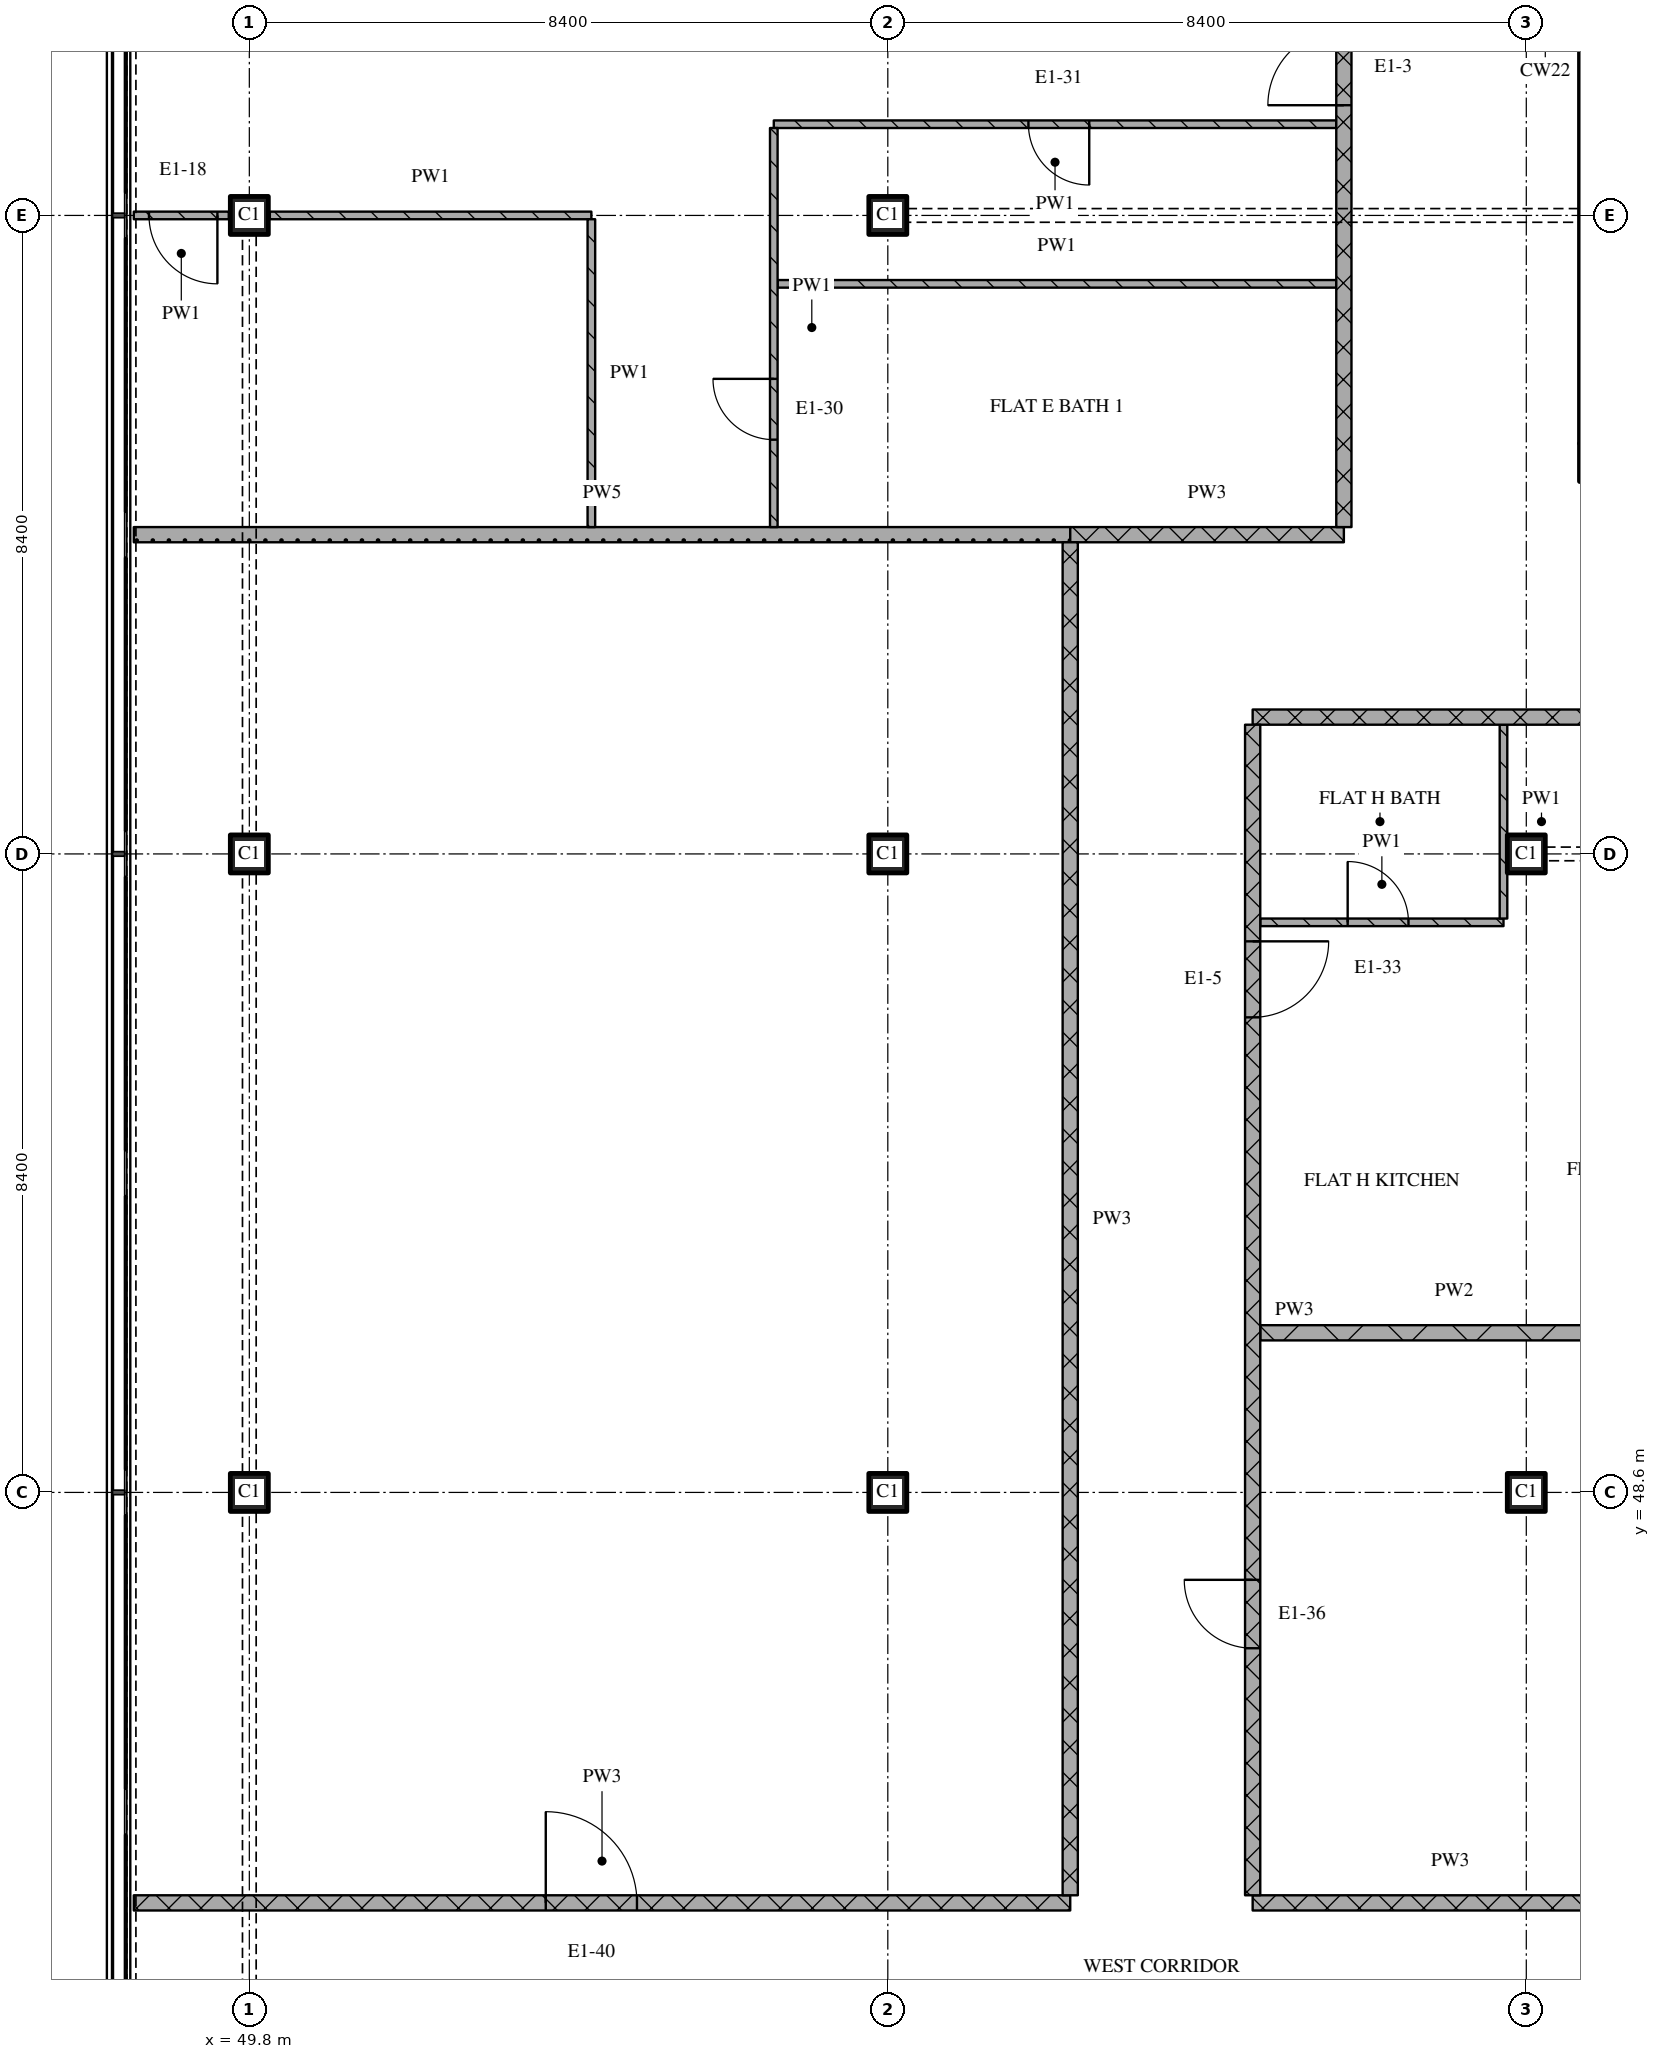
"""IFC4 building model, lengths in metres.
Left out: names, types, materials, properties, quantities, classifications, styles, units other than length and angle.
Written with IfcOpenShell. Run it as: python <this file> out.ifc"""

import sys

from ifc_helpers import new_model, si_unit, direction, frame, frame_2d, origin, origin_2d, place, context, subcontext, project, spatial, rectangle, extrude, element, fill, save


model = new_model("IFC4")
c1 = context("Model", 3, precision=1e-05, world=origin(), true_north=direction((0.0, 1.0)))
c2 = subcontext(c1, "Body", "Model", "MODEL_VIEW")
j1 = project(units=[si_unit("LENGTHUNIT", "METRE"), si_unit("PLANEANGLEUNIT", "RADIAN")], contexts=[c1])
p1 = place(None, origin())
s1 = spatial("IfcSite", under=j1, at=p1, CompositionType="ELEMENT")
p2 = place(p1, origin())
s2 = spatial("IfcBuilding", under=s1, at=p2, CompositionType="ELEMENT")
p3 = place(p2, frame((0.0, 0.0, 267.15)))
s3 = spatial("IfcBuildingStorey", under=s2, at=p3, CompositionType="ELEMENT", Elevation=267.15)
for number, where, z_axis, x_axis in (
    (1, (49.8, 48.6, 0.0), (0.0, 0.0, 1.0), (1.0, 0.0, 0.0)),
    (2, (49.8, 57.0, 0.0), (0.0, 0.0, 1.0), (1.0, 0.0, 0.0)),
    (3, (49.8, 65.4, 0.0), (0.0, 0.0, 1.0), (1.0, 0.0, 0.0)),
    (4, (58.2, 48.6, 0.0), (0.0, 0.0, 1.0), (1.0, 0.0, 0.0)),
    (5, (58.2, 57.0, 0.0), (0.0, 0.0, 1.0), (1.0, 0.0, 0.0)),
    (6, (58.2, 65.4, 0.0), (0.0, 0.0, 1.0), (1.0, 0.0, 0.0)),
    (7, (66.6, 48.6, 0.0), (0.0, 0.0, 1.0), (1.0, 0.0, 0.0)),
    (8, (66.6, 57.0, 0.0), (0.0, 0.0, 1.0), (1.0, 0.0, 0.0)),
):
    element("IfcColumn", number, at=place(p3, frame(where, z_axis=z_axis, x_axis=x_axis)), inside=s3, PredefinedType="COLUMN", context=c2, shape_type="SweptSolid", body=[
        extrude(rectangle(XDim=0.5, YDim=0.5, at=origin_2d()), origin(), (0.0, 0.0, 1.0), 3.6),
    ])
p4 = place(p3, frame((67.3, 62.15, 0.0), z_axis=(0.0, 0.0, 1.0), x_axis=(1.0, 0.0, 0.0)))
e9 = element("IfcWall", 9, at=p4, inside=s3, PredefinedType="SOLIDWALL", context=c2, shape_type="SweptSolid", body=[
    extrude(rectangle(XDim=40.6, YDim=0.5, at=frame_2d((20.3, 0.0))), origin(), (0.0, 0.0, 1.0), 3.32),
])
p5 = place(p4, frame((20.65, 0.0, 0.0)))
e10 = element("IfcOpeningElement", 10, at=p5, cuts=e9, PredefinedType="OPENING", context=c2, shape_type="SweptSolid", body=[
    extrude(rectangle(XDim=1.8, YDim=2.1, at=frame_2d((0.9, 1.05))), frame((0.0, 0.26, 0.0), z_axis=(0.0, -1.0, 0.0), x_axis=(1.0, 0.0, 0.0)), (0.0, 0.0, 1.0), 0.52),
])
p6 = place(p3, frame((48.28, 43.2, 0.0), z_axis=(0.0, 0.0, 1.0), x_axis=(1.0, 0.0, 0.0)))
e11 = element("IfcWall", 11, at=p6, inside=s3, PredefinedType="PARTITIONING", context=c2, shape_type="SweptSolid", body=[
    extrude(rectangle(XDim=12.32, YDim=0.2, at=frame_2d((6.16, 0.0))), origin(), (0.0, 0.0, 1.0), 3.32),
])
p7 = place(p6, frame((5.42, 0.0, 0.0)))
e12 = element("IfcOpeningElement", 12, at=p7, cuts=e11, PredefinedType="OPENING", context=c2, shape_type="SweptSolid", body=[
    extrude(rectangle(XDim=1.2, YDim=2.1, at=frame_2d((0.6, 1.05))), frame((0.0, 0.11, 0.0), z_axis=(0.0, -1.0, 0.0), x_axis=(1.0, 0.0, 0.0)), (0.0, 0.0, 1.0), 0.22),
])
p8 = place(p3, frame((63.0, 43.2, 0.0), z_axis=(0.0, 0.0, 1.0), x_axis=(1.0, 0.0, 0.0)))
e13 = element("IfcWall", 13, at=p8, inside=s3, PredefinedType="PARTITIONING", context=c2, shape_type="SweptSolid", body=[
    extrude(rectangle(XDim=5.2, YDim=0.2, at=frame_2d((2.6, 0.0))), origin(), (0.0, 0.0, 1.0), 3.32),
])
p9 = place(p3, frame((63.1, 50.7, 0.0), z_axis=(0.0, 0.0, 1.0), x_axis=(1.0, 0.0, 0.0)))
e14 = element("IfcWall", 14, at=p9, inside=s3, PredefinedType="PARTITIONING", context=c2, shape_type="SweptSolid", body=[
    extrude(rectangle(XDim=5.1, YDim=0.2, at=frame_2d((2.55, 0.0))), origin(), (0.0, 0.0, 1.0), 3.32),
])
p10 = place(p3, frame((63.1, 56.1, 0.0), z_axis=(0.0, 0.0, 1.0), x_axis=(1.0, 0.0, 0.0)))
e15 = element("IfcWall", 15, at=p10, inside=s3, PredefinedType="PARTITIONING", context=c2, shape_type="SweptSolid", body=[
    extrude(rectangle(XDim=3.2, YDim=0.1, at=frame_2d((1.6, 0.0))), origin(), (0.0, 0.0, 1.0), 3.32),
])
p11 = place(p10, frame((1.15, 0.0, 0.0)))
e16 = element("IfcOpeningElement", 16, at=p11, cuts=e15, PredefinedType="OPENING", context=c2, shape_type="SweptSolid", body=[
    extrude(rectangle(XDim=0.8, YDim=2.1, at=frame_2d((0.4, 1.05))), frame((0.0, 0.06, 0.0), z_axis=(0.0, -1.0, 0.0), x_axis=(1.0, 0.0, 0.0)), (0.0, 0.0, 1.0), 0.12),
])
p12 = place(p3, frame((63.0, 58.8, 0.0), z_axis=(0.0, 0.0, 1.0), x_axis=(1.0, 0.0, 0.0)))
e17 = element("IfcWall", 17, at=p12, inside=s3, PredefinedType="PARTITIONING", context=c2, shape_type="SweptSolid", body=[
    extrude(rectangle(XDim=10.8, YDim=0.2, at=frame_2d((5.4, 0.0))), origin(), (0.0, 0.0, 1.0), 3.32),
])
p13 = place(p3, frame((60.6, 61.2, 0.0), z_axis=(0.0, 0.0, 1.0), x_axis=(1.0, 0.0, 0.0)))
e18 = element("IfcWall", 18, at=p13, inside=s3, PredefinedType="PARTITIONING", context=c2, shape_type="SweptSolid", body=[
    extrude(rectangle(XDim=3.6, YDim=0.2, at=frame_2d((1.8, 0.0))), origin(), (0.0, 0.0, 1.0), 3.32),
])
p14 = place(p3, frame((48.28, 61.2, 0.0), z_axis=(0.0, 0.0, 1.0), x_axis=(1.0, 0.0, 0.0)))
e19 = element("IfcWall", 19, at=p14, inside=s3, PredefinedType="PARTITIONING", context=c2, shape_type="SweptSolid", body=[
    extrude(rectangle(XDim=12.32, YDim=0.2, at=frame_2d((6.16, 0.0))), origin(), (0.0, 0.0, 1.0), 3.32),
])
p15 = place(p3, frame((56.75, 64.5, 0.0), z_axis=(0.0, 0.0, 1.0), x_axis=(1.0, 0.0, 0.0)))
e20 = element("IfcWall", 20, at=p15, inside=s3, PredefinedType="PARTITIONING", context=c2, shape_type="SweptSolid", body=[
    extrude(rectangle(XDim=7.35, YDim=0.1, at=frame_2d((3.675, 0.0))), origin(), (0.0, 0.0, 1.0), 3.32),
])
p16 = place(p3, frame((49.53, 65.4, 0.0), z_axis=(0.0, 0.0, 1.0), x_axis=(-1.0, 0.0, 0.0)))
e21 = element("IfcWall", 21, at=p16, inside=s3, PredefinedType="PARTITIONING", context=c2, shape_type="SweptSolid", body=[
    extrude(rectangle(XDim=1.25, YDim=0.1, at=frame_2d((0.625, 0.0))), origin(), (0.0, 0.0, 1.0), 3.32),
])
p17 = place(p16, frame((0.15, 0.0, 0.0)))
e22 = element("IfcOpeningElement", 22, at=p17, cuts=e21, PredefinedType="OPENING", context=c2, shape_type="SweptSolid", body=[
    extrude(rectangle(XDim=0.9, YDim=2.1, at=frame_2d((0.45, 1.05))), frame((0.0, 0.06, 0.0), z_axis=(0.0, -1.0, 0.0), x_axis=(1.0, 0.0, 0.0)), (0.0, 0.0, 1.0), 0.12),
])
p18 = place(p3, frame((50.07, 65.4, 0.0), z_axis=(0.0, 0.0, 1.0), x_axis=(1.0, 0.0, 0.0)))
e23 = element("IfcWall", 23, at=p18, inside=s3, PredefinedType="PARTITIONING", context=c2, shape_type="SweptSolid", body=[
    extrude(rectangle(XDim=4.23, YDim=0.1, at=frame_2d((2.115, 0.0))), origin(), (0.0, 0.0, 1.0), 2.83),
])
p19 = place(p3, frame((64.1, 66.6, 0.0), z_axis=(0.0, 0.0, 1.0), x_axis=(-1.0, 0.0, 0.0)))
e24 = element("IfcWall", 24, at=p19, inside=s3, PredefinedType="PARTITIONING", context=c2, shape_type="SweptSolid", body=[
    extrude(rectangle(XDim=7.4, YDim=0.1, at=frame_2d((3.7, 0.0))), origin(), (0.0, 0.0, 1.0), 3.32),
])
p20 = place(p19, frame((3.25, 0.0, 0.0)))
e25 = element("IfcOpeningElement", 25, at=p20, cuts=e24, PredefinedType="OPENING", context=c2, shape_type="SweptSolid", body=[
    extrude(rectangle(XDim=0.8, YDim=2.1, at=frame_2d((0.4, 1.05))), frame((0.0, 0.06, 0.0), z_axis=(0.0, -1.0, 0.0), x_axis=(1.0, 0.0, 0.0)), (0.0, 0.0, 1.0), 0.12),
])
p21 = place(p3, frame((54.3, 65.35, 0.0), z_axis=(0.0, 0.0, 1.0), x_axis=(0.0, -1.0, 0.0)))
e26 = element("IfcWall", 26, at=p21, inside=s3, PredefinedType="PARTITIONING", context=c2, shape_type="SweptSolid", body=[
    extrude(rectangle(XDim=4.05, YDim=0.1, at=frame_2d((2.025, 0.0))), origin(), (0.0, 0.0, 1.0), 3.32),
])
p22 = place(p3, frame((56.7, 66.55, 0.0), z_axis=(0.0, 0.0, 1.0), x_axis=(0.0, -1.0, 0.0)))
e27 = element("IfcWall", 27, at=p22, inside=s3, PredefinedType="PARTITIONING", context=c2, shape_type="SweptSolid", body=[
    extrude(rectangle(XDim=5.25, YDim=0.1, at=frame_2d((2.625, 0.0))), origin(), (0.0, 0.0, 1.0), 3.32),
])
p23 = place(p22, frame((3.3, 0.0, 0.0)))
e28 = element("IfcOpeningElement", 28, at=p23, cuts=e27, PredefinedType="OPENING", context=c2, shape_type="SweptSolid", body=[
    extrude(rectangle(XDim=0.8, YDim=2.1, at=frame_2d((0.4, 1.05))), frame((0.0, 0.06, 0.0), z_axis=(0.0, -1.0, 0.0), x_axis=(1.0, 0.0, 0.0)), (0.0, 0.0, 1.0), 0.12),
])
p24 = place(p3, frame((60.6, 61.1, 0.0), z_axis=(0.0, 0.0, 1.0), x_axis=(0.0, -1.0, 0.0)))
e29 = element("IfcWall", 29, at=p24, inside=s3, PredefinedType="PARTITIONING", context=c2, shape_type="SweptSolid", body=[
    extrude(rectangle(XDim=17.8, YDim=0.2, at=frame_2d((8.9, 0.0))), origin(), (0.0, 0.0, 1.0), 3.32),
])
p25 = place(p3, frame((63.0, 58.7, 0.0), z_axis=(0.0, 0.0, 1.0), x_axis=(0.0, -1.0, 0.0)))
e30 = element("IfcWall", 30, at=p25, inside=s3, PredefinedType="PARTITIONING", context=c2, shape_type="SweptSolid", body=[
    extrude(rectangle(XDim=15.4, YDim=0.2, at=frame_2d((7.7, 0.0))), origin(), (0.0, 0.0, 1.0), 3.32),
])
p26 = place(p25, frame((2.85, 0.0, 0.0)))
e31 = element("IfcOpeningElement", 31, at=p26, cuts=e30, PredefinedType="OPENING", context=c2, shape_type="SweptSolid", body=[
    extrude(rectangle(XDim=1.0, YDim=2.1, at=frame_2d((0.5, 1.05))), frame((0.0, 0.11, 0.0), z_axis=(0.0, -1.0, 0.0), x_axis=(1.0, 0.0, 0.0)), (0.0, 0.0, 1.0), 0.22),
])
p27 = place(p25, frame((11.25, 0.0, 0.0)))
e32 = element("IfcOpeningElement", 32, at=p27, cuts=e30, PredefinedType="OPENING", context=c2, shape_type="SweptSolid", body=[
    extrude(rectangle(XDim=0.9, YDim=2.1, at=frame_2d((0.45, 1.05))), frame((0.0, 0.11, 0.0), z_axis=(0.0, -1.0, 0.0), x_axis=(1.0, 0.0, 0.0)), (0.0, 0.0, 1.0), 0.22),
])
p28 = place(p3, frame((64.2, 61.3, 0.0), z_axis=(0.0, 0.0, 1.0), x_axis=(0.0, 1.0, 0.0)))
e33 = element("IfcWall", 33, at=p28, inside=s3, PredefinedType="PARTITIONING", context=c2, shape_type="SweptSolid", body=[
    extrude(rectangle(XDim=14.02, YDim=0.2, at=frame_2d((7.01, 0.0))), origin(), (0.0, 0.0, 1.0), 3.32),
])
p29 = place(p28, frame((5.55, 0.0, 0.0)))
e34 = element("IfcOpeningElement", 34, at=p29, cuts=e33, PredefinedType="OPENING", context=c2, shape_type="SweptSolid", body=[
    extrude(rectangle(XDim=1.0, YDim=2.1, at=frame_2d((0.5, 1.05))), frame((0.0, 0.11, 0.0), z_axis=(0.0, -1.0, 0.0), x_axis=(1.0, 0.0, 0.0)), (0.0, 0.0, 1.0), 0.22),
])
p30 = place(p3, frame((66.3, 58.7, 0.0), z_axis=(0.0, 0.0, 1.0), x_axis=(0.0, -1.0, 0.0)))
e35 = element("IfcWall", 35, at=p30, inside=s3, PredefinedType="PARTITIONING", context=c2, shape_type="SweptSolid", body=[
    extrude(rectangle(XDim=2.55, YDim=0.1, at=frame_2d((1.275, 0.0))), origin(), (0.0, 0.0, 1.0), 3.32),
])
p31 = place(p7, origin())
e36 = element("IfcDoor", 36, at=p31, inside=s3, OperationType="SINGLE_SWING_LEFT", PredefinedType="DOOR", context=c2, shape_type="SweptSolid", body=[
    extrude(rectangle(XDim=1.2, YDim=2.1, at=frame_2d((0.6, 1.05))), frame((0.0, 0.025, 0.0), z_axis=(0.0, -1.0, 0.0), x_axis=(1.0, 0.0, 0.0)), (0.0, 0.0, 1.0), 0.05),
])
fill(e12, e36)
p32 = place(p11, origin())
e37 = element("IfcDoor", 37, at=p32, inside=s3, OperationType="SINGLE_SWING_LEFT", PredefinedType="DOOR", context=c2, shape_type="SweptSolid", body=[
    extrude(rectangle(XDim=0.8, YDim=2.1, at=frame_2d((0.4, 1.05))), frame((0.0, 0.025, 0.0), z_axis=(0.0, -1.0, 0.0), x_axis=(1.0, 0.0, 0.0)), (0.0, 0.0, 1.0), 0.05),
])
fill(e16, e37)
p33 = place(p17, origin())
e38 = element("IfcDoor", 38, at=p33, inside=s3, OperationType="SINGLE_SWING_LEFT", PredefinedType="DOOR", context=c2, shape_type="SweptSolid", body=[
    extrude(rectangle(XDim=0.9, YDim=2.1, at=frame_2d((0.45, 1.05))), frame((0.0, 0.025, 0.0), z_axis=(0.0, -1.0, 0.0), x_axis=(1.0, 0.0, 0.0)), (0.0, 0.0, 1.0), 0.05),
])
fill(e22, e38)
p34 = place(p20, origin())
e39 = element("IfcDoor", 39, at=p34, inside=s3, OperationType="SINGLE_SWING_LEFT", PredefinedType="DOOR", context=c2, shape_type="SweptSolid", body=[
    extrude(rectangle(XDim=0.8, YDim=2.1, at=frame_2d((0.4, 1.05))), frame((0.0, 0.025, 0.0), z_axis=(0.0, -1.0, 0.0), x_axis=(1.0, 0.0, 0.0)), (0.0, 0.0, 1.0), 0.05),
])
fill(e25, e39)
p35 = place(p23, origin())
e40 = element("IfcDoor", 40, at=p35, inside=s3, OperationType="SINGLE_SWING_RIGHT", PredefinedType="DOOR", context=c2, shape_type="SweptSolid", body=[
    extrude(rectangle(XDim=0.8, YDim=2.1, at=frame_2d((0.4, 1.05))), frame((0.0, 0.025, 0.0), z_axis=(0.0, -1.0, 0.0), x_axis=(1.0, 0.0, 0.0)), (0.0, 0.0, 1.0), 0.05),
])
fill(e28, e40)
p36 = place(p26, origin())
e41 = element("IfcDoor", 41, at=p36, inside=s3, OperationType="SINGLE_SWING_LEFT", PredefinedType="DOOR", context=c2, shape_type="SweptSolid", body=[
    extrude(rectangle(XDim=1.0, YDim=2.1, at=frame_2d((0.5, 1.05))), frame((0.0, 0.025, 0.0), z_axis=(0.0, -1.0, 0.0), x_axis=(1.0, 0.0, 0.0)), (0.0, 0.0, 1.0), 0.05),
])
fill(e31, e41)
p37 = place(p27, origin())
e42 = element("IfcDoor", 42, at=p37, inside=s3, OperationType="SINGLE_SWING_RIGHT", PredefinedType="DOOR", context=c2, shape_type="SweptSolid", body=[
    extrude(rectangle(XDim=0.9, YDim=2.1, at=frame_2d((0.45, 1.05))), frame((0.0, 0.025, 0.0), z_axis=(0.0, -1.0, 0.0), x_axis=(1.0, 0.0, 0.0)), (0.0, 0.0, 1.0), 0.05),
])
fill(e32, e42)
p38 = place(p29, origin())
e43 = element("IfcDoor", 43, at=p38, inside=s3, OperationType="SINGLE_SWING_LEFT", PredefinedType="DOOR", context=c2, shape_type="SweptSolid", body=[
    extrude(rectangle(XDim=1.0, YDim=2.1, at=frame_2d((0.5, 1.05))), frame((0.0, 0.025, 0.0), z_axis=(0.0, -1.0, 0.0), x_axis=(1.0, 0.0, 0.0)), (0.0, 0.0, 1.0), 0.05),
])
fill(e34, e43)
save(model, sys.argv[1])
